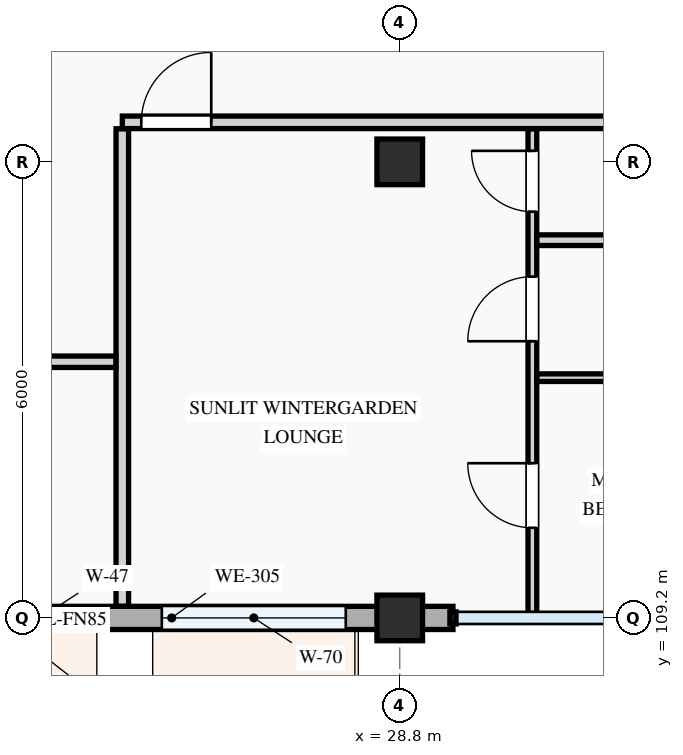
"""IFC4 building model, lengths in metres.
Left out: names, types, materials, properties, quantities, classifications, styles, units other than length and angle.
Written with IfcOpenShell. Run it as: python <this file> out.ifc"""

import sys

from ifc_helpers import new_model, si_unit, direction, frame, frame_2d, origin, origin_2d, place, context, subcontext, project, spatial, rectangle, extrude, element, fill, save


model = new_model("IFC4")
c1 = context("Model", 3, precision=1e-05, world=origin(), true_north=direction((0.0, 1.0)))
c2 = subcontext(c1, "Body", "Model", "MODEL_VIEW")
j1 = project(units=[si_unit("LENGTHUNIT", "METRE"), si_unit("PLANEANGLEUNIT", "RADIAN")], contexts=[c1])
p1 = place(None, origin())
s1 = spatial("IfcSite", under=j1, at=p1, CompositionType="ELEMENT")
p2 = place(p1, origin())
s2 = spatial("IfcBuilding", under=s1, at=p2, CompositionType="ELEMENT")
p3 = place(p2, frame((0.0, 0.0, 24.6)))
s3 = spatial("IfcBuildingStorey", under=s2, at=p3, CompositionType="ELEMENT", Elevation=24.6)
for number, where, z_axis, x_axis in (
    (1, (28.8, 109.2, 0.0), (0.0, 0.0, 1.0), (1.0, 0.0, 0.0)),
    (2, (28.8, 115.2, 0.0), (0.0, 0.0, 1.0), (1.0, 0.0, 0.0)),
):
    element("IfcColumn", number, at=place(p3, frame(where, z_axis=z_axis, x_axis=x_axis)), inside=s3, PredefinedType="COLUMN", context=c2, shape_type="SweptSolid", body=[
        extrude(rectangle(XDim=0.6, YDim=0.6, at=origin_2d()), origin(), (0.0, 0.0, 1.0), 3.3),
    ])
p4 = place(p3, frame((22.8, 109.2, 0.0), z_axis=(0.0, 0.0, 1.0), x_axis=(1.0, 0.0, 0.0)))
e3 = element("IfcWall", 3, at=p4, inside=s3, PredefinedType="STANDARD", context=c2, shape_type="SweptSolid", body=[
    extrude(rectangle(XDim=6.0, YDim=0.305, at=frame_2d((3.0, 0.0))), origin(), (0.0, 0.0, 1.0), 2.475),
])
p5 = place(p4, frame((0.645, 0.0, 0.78)))
e4 = element("IfcOpeningElement", 4, at=p5, cuts=e3, PredefinedType="OPENING", context=c2, shape_type="SweptSolid", body=[
    extrude(rectangle(XDim=1.25, YDim=1.45, at=frame_2d((0.625, 0.725))), frame((0.0, 0.163, 0.0), z_axis=(0.0, -1.0, 0.0), x_axis=(1.0, 0.0, 0.0)), (0.0, 0.0, 1.0), 0.325),
])
p6 = place(p4, frame((2.87, 0.0, 0.78)))
e5 = element("IfcOpeningElement", 5, at=p6, cuts=e3, PredefinedType="OPENING", context=c2, shape_type="SweptSolid", body=[
    extrude(rectangle(XDim=2.42, YDim=1.52, at=frame_2d((1.21, 0.76))), frame((0.0, 0.163, 0.0), z_axis=(0.0, -1.0, 0.0), x_axis=(1.0, 0.0, 0.0)), (0.0, 0.0, 1.0), 0.325),
])
p7 = place(p3, frame((28.8, 109.2, 0.0), z_axis=(0.0, 0.0, 1.0), x_axis=(1.0, 0.0, 0.0)))
e6 = element("IfcWall", 6, at=p7, inside=s3, PredefinedType="STANDARD", context=c2, shape_type="SweptSolid", body=[
    extrude(rectangle(XDim=0.7, YDim=0.305, at=frame_2d((0.35, 0.0))), origin(), (0.0, 0.0, 1.0), 2.375),
])
p8 = place(p3, frame((25.15, 109.354, 0.0), z_axis=(0.0, 0.0, 1.0), x_axis=(0.0, 1.0, 0.0)))
e7 = element("IfcWall", 7, at=p8, inside=s3, PredefinedType="PARTITIONING", context=c2, shape_type="SweptSolid", body=[
    extrude(rectangle(XDim=6.281, YDim=0.165, at=frame_2d((3.141, 0.0))), origin(), (0.0, 0.0, 1.0), 3.0),
])
p9 = place(p3, frame((22.66, 112.57, 0.0), z_axis=(0.0, 0.0, 1.0), x_axis=(1.0, 0.0, 0.0)))
e8 = element("IfcWall", 8, at=p9, inside=s3, PredefinedType="PARTITIONING", context=c2, shape_type="SweptSolid", body=[
    extrude(rectangle(XDim=2.406, YDim=0.15, at=frame_2d((1.203, 0.0))), origin(), (0.0, 0.0, 1.0), 3.0),
])
p10 = place(p3, frame((30.545, 109.26, 0.0), z_axis=(0.0, 0.0, 1.0), x_axis=(0.0, 1.0, 0.0)))
e9 = element("IfcWall", 9, at=p10, inside=s3, PredefinedType="PARTITIONING", context=c2, shape_type="SweptSolid", body=[
    extrude(rectangle(XDim=6.375, YDim=0.115, at=frame_2d((3.188, 0.0))), origin(), (0.0, 0.0, 1.0), 3.0),
])
p11 = place(p10, frame((1.125, 0.0, 0.0)))
e10 = element("IfcOpeningElement", 10, at=p11, cuts=e9, PredefinedType="OPENING", context=c2, shape_type="SweptSolid", body=[
    extrude(rectangle(XDim=0.85, YDim=2.1, at=frame_2d((0.425, 1.05))), frame((0.0, 0.067, 0.0), z_axis=(0.0, -1.0, 0.0), x_axis=(1.0, 0.0, 0.0)), (0.0, 0.0, 1.0), 0.135),
])
p12 = place(p10, frame((3.58, 0.0, 0.0)))
e11 = element("IfcOpeningElement", 11, at=p12, cuts=e9, PredefinedType="OPENING", context=c2, shape_type="SweptSolid", body=[
    extrude(rectangle(XDim=0.85, YDim=2.1, at=frame_2d((0.425, 1.05))), frame((0.0, 0.067, 0.0), z_axis=(0.0, -1.0, 0.0), x_axis=(1.0, 0.0, 0.0)), (0.0, 0.0, 1.0), 0.135),
])
p13 = place(p10, frame((5.285, 0.0, 0.0)))
e12 = element("IfcOpeningElement", 12, at=p13, cuts=e9, PredefinedType="OPENING", context=c2, shape_type="SweptSolid", body=[
    extrude(rectangle(XDim=0.8, YDim=2.1, at=frame_2d((0.4, 1.05))), frame((0.0, 0.067, 0.0), z_axis=(0.0, -1.0, 0.0), x_axis=(1.0, 0.0, 0.0)), (0.0, 0.0, 1.0), 0.135),
])
p14 = place(p3, frame((30.604, 112.361, 0.0), z_axis=(0.0, 0.0, 1.0), x_axis=(1.0, 0.0, 0.0)))
e13 = element("IfcWall", 13, at=p14, inside=s3, PredefinedType="PARTITIONING", context=c2, shape_type="SweptSolid", body=[
    extrude(rectangle(XDim=1.833, YDim=0.1, at=frame_2d((0.917, 0.0))), origin(), (0.0, 0.0, 1.0), 3.0),
])
p15 = place(p3, frame((30.604, 114.17, 0.0), z_axis=(0.0, 0.0, 1.0), x_axis=(1.0, 0.0, 0.0)))
e14 = element("IfcWall", 14, at=p15, inside=s3, PredefinedType="PARTITIONING", context=c2, shape_type="SweptSolid", body=[
    extrude(rectangle(XDim=1.833, YDim=0.14, at=frame_2d((0.917, 0.0))), origin(), (0.0, 0.0, 1.0), 3.0),
])
p16 = place(p3, frame((25.15, 115.72, 0.0), z_axis=(0.0, 0.0, 1.0), x_axis=(1.0, 0.0, 0.0)))
e15 = element("IfcWall", 15, at=p16, inside=s3, PredefinedType="PARTITIONING", context=c2, shape_type="SweptSolid", body=[
    extrude(rectangle(XDim=26.296, YDim=0.165, at=frame_2d((13.148, 0.0))), origin(), (0.0, 0.0, 1.0), 3.0),
])
p17 = place(p16, frame((0.25, 0.0, 0.0)))
e16 = element("IfcOpeningElement", 16, at=p17, cuts=e15, PredefinedType="OPENING", context=c2, shape_type="SweptSolid", body=[
    extrude(rectangle(XDim=0.92, YDim=2.1, at=frame_2d((0.46, 1.05))), frame((0.0, 0.093, 0.0), z_axis=(0.0, -1.0, 0.0), x_axis=(1.0, 0.0, 0.0)), (0.0, 0.0, 1.0), 0.185),
])
p18 = place(p16, frame((7.64, 0.0, 0.0)))
e17 = element("IfcOpeningElement", 17, at=p18, cuts=e15, PredefinedType="OPENING", context=c2, shape_type="SweptSolid", body=[
    extrude(rectangle(XDim=0.92, YDim=2.1, at=frame_2d((0.46, 1.05))), frame((0.0, 0.093, 0.0), z_axis=(0.0, -1.0, 0.0), x_axis=(1.0, 0.0, 0.0)), (0.0, 0.0, 1.0), 0.185),
])
p19 = place(p16, frame((15.03, 0.0, 0.0)))
e18 = element("IfcOpeningElement", 18, at=p19, cuts=e15, PredefinedType="OPENING", context=c2, shape_type="SweptSolid", body=[
    extrude(rectangle(XDim=0.96, YDim=2.12, at=frame_2d((0.48, 1.06))), frame((0.0, 0.093, 0.0), z_axis=(0.0, -1.0, 0.0), x_axis=(1.0, 0.0, 0.0)), (0.0, 0.0, 1.0), 0.185),
])
p20 = place(p5, origin())
e19 = element("IfcWindow", 19, at=p20, inside=s3, PartitioningType="SINGLE_PANEL", PredefinedType="WINDOW", context=c2, shape_type="SweptSolid", body=[
    extrude(rectangle(XDim=1.25, YDim=1.45, at=frame_2d((0.625, 0.725))), frame((0.0, 0.03, 0.0), z_axis=(0.0, -1.0, 0.0), x_axis=(1.0, 0.0, 0.0)), (0.0, 0.0, 1.0), 0.06),
])
fill(e4, e19)
p21 = place(p6, origin())
e20 = element("IfcWindow", 20, at=p21, inside=s3, PartitioningType="DOUBLE_PANEL_VERTICAL", PredefinedType="WINDOW", context=c2, shape_type="SweptSolid", body=[
    extrude(rectangle(XDim=2.42, YDim=1.52, at=frame_2d((1.21, 0.76))), frame((0.0, 0.03, 0.0), z_axis=(0.0, -1.0, 0.0), x_axis=(1.0, 0.0, 0.0)), (0.0, 0.0, 1.0), 0.06),
])
fill(e5, e20)
p22 = place(p11, origin())
e21 = element("IfcDoor", 21, at=p22, inside=s3, OperationType="SINGLE_SWING_RIGHT", PredefinedType="DOOR", context=c2, shape_type="SweptSolid", body=[
    extrude(rectangle(XDim=0.85, YDim=2.1, at=frame_2d((0.425, 1.05))), frame((0.0, 0.025, 0.0), z_axis=(0.0, -1.0, 0.0), x_axis=(1.0, 0.0, 0.0)), (0.0, 0.0, 1.0), 0.05),
])
fill(e10, e21)
p23 = place(p12, origin())
e22 = element("IfcDoor", 22, at=p23, inside=s3, OperationType="SINGLE_SWING_LEFT", PredefinedType="DOOR", context=c2, shape_type="SweptSolid", body=[
    extrude(rectangle(XDim=0.85, YDim=2.1, at=frame_2d((0.425, 1.05))), frame((0.0, 0.025, 0.0), z_axis=(0.0, -1.0, 0.0), x_axis=(1.0, 0.0, 0.0)), (0.0, 0.0, 1.0), 0.05),
])
fill(e11, e22)
p24 = place(p13, origin())
e23 = element("IfcDoor", 23, at=p24, inside=s3, OperationType="SINGLE_SWING_RIGHT", PredefinedType="DOOR", context=c2, shape_type="SweptSolid", body=[
    extrude(rectangle(XDim=0.8, YDim=2.1, at=frame_2d((0.4, 1.05))), frame((0.0, 0.025, 0.0), z_axis=(0.0, -1.0, 0.0), x_axis=(1.0, 0.0, 0.0)), (0.0, 0.0, 1.0), 0.05),
])
fill(e12, e23)
p25 = place(p17, origin())
e24 = element("IfcDoor", 24, at=p25, inside=s3, OperationType="SINGLE_SWING_RIGHT", PredefinedType="DOOR", context=c2, shape_type="SweptSolid", body=[
    extrude(rectangle(XDim=0.92, YDim=2.1, at=frame_2d((0.46, 1.05))), frame((0.0, 0.025, 0.0), z_axis=(0.0, -1.0, 0.0), x_axis=(1.0, 0.0, 0.0)), (0.0, 0.0, 1.0), 0.05),
])
fill(e16, e24)
save(model, sys.argv[1])
